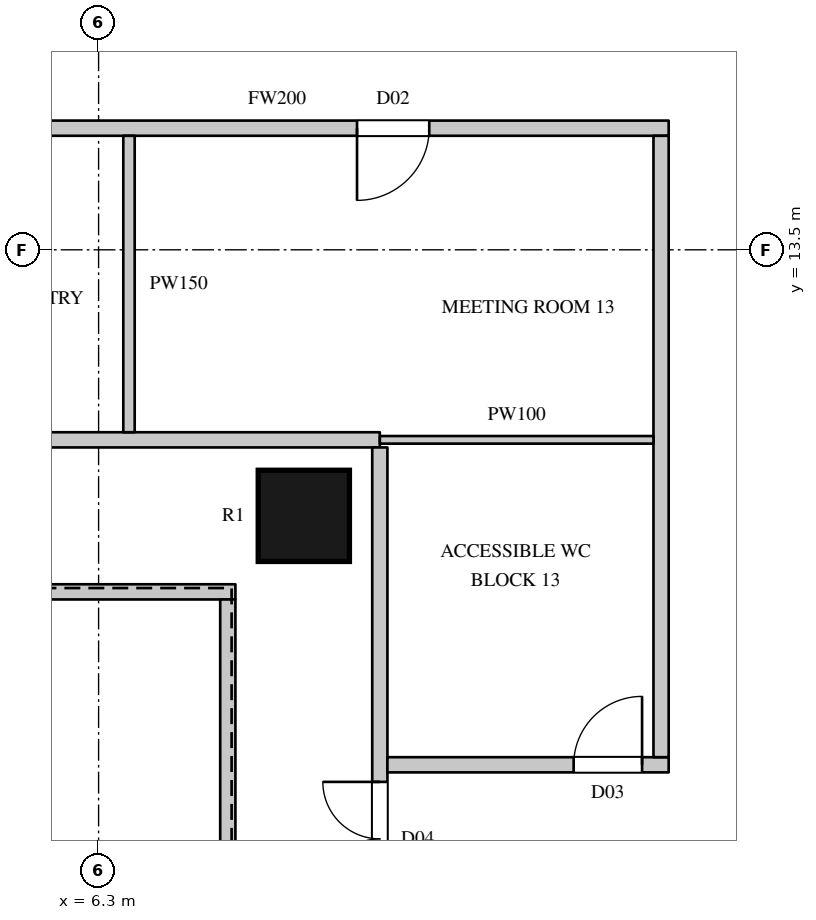
"""IFC4 building model, lengths in metres.
Left out: names, types, materials, properties, quantities, classifications, styles, units other than length and angle.
Written with IfcOpenShell. Run it as: python <this file> out.ifc"""

import sys

from ifc_helpers import new_model, si_unit, direction, frame, frame_2d, origin, origin_2d, place, context, subcontext, project, spatial, rectangle, circle, extrude, element, fill, save


model = new_model("IFC4")
c1 = context("Model", 3, precision=1e-05, world=origin(), true_north=direction((0.0, 1.0)))
c2 = subcontext(c1, "Body", "Model", "MODEL_VIEW")
j1 = project(units=[si_unit("LENGTHUNIT", "METRE"), si_unit("PLANEANGLEUNIT", "RADIAN")], contexts=[c1])
p1 = place(None, origin())
s1 = spatial("IfcSite", under=j1, at=p1, CompositionType="ELEMENT")
p2 = place(p1, origin())
s2 = spatial("IfcBuilding", under=s1, at=p2, CompositionType="ELEMENT")
p3 = place(p2, frame((0.0, 0.0, 77.1)))
s3 = spatial("IfcBuildingStorey", under=s2, at=p3, CompositionType="ELEMENT", Elevation=77.1)
p4 = place(p3, frame((9.0, 10.0, 0.0), z_axis=(0.0, 0.0, 1.0), x_axis=(1.0, 0.0, 0.0)))
e1 = element("IfcColumn", 1, at=p4, inside=s3, PredefinedType="COLUMN", context=c2, shape_type="SweptSolid", body=[
    extrude(circle(Radius=0.6, at=origin_2d()), origin(), (0.0, 0.0, 1.0), 3.6),
])
p5 = place(p3, frame((-7.9, 11.0, 0.0), z_axis=(0.0, 0.0, 1.0), x_axis=(1.0, 0.0, 0.0)))
e2 = element("IfcWall", 2, at=p5, inside=s3, PredefinedType="PARTITIONING", context=c2, shape_type="SweptSolid", body=[
    extrude(rectangle(XDim=17.9, YDim=0.2, at=frame_2d((8.95, 0.0))), origin(), (0.0, 0.0, 1.0), 3.3),
])
p6 = place(p5, frame((9.5, 0.0, 0.0)))
e3 = element("IfcOpeningElement", 3, at=p6, cuts=e2, PredefinedType="OPENING", context=c2, shape_type="SweptSolid", body=[
    extrude(rectangle(XDim=1.5, YDim=2.2, at=frame_2d((0.75, 1.1))), frame((0.0, 0.11, 0.0), z_axis=(0.0, -1.0, 0.0), x_axis=(1.0, 0.0, 0.0)), (0.0, 0.0, 1.0), 0.22),
])
p7 = place(p3, frame((-6.1, 9.0, 0.0), z_axis=(0.0, 0.0, 1.0), x_axis=(1.0, 0.0, 0.0)))
e4 = element("IfcWall", 4, at=p7, inside=s3, PredefinedType="PARTITIONING", context=c2, shape_type="SweptSolid", body=[
    extrude(rectangle(XDim=14.2, YDim=0.2, at=frame_2d((7.1, 0.0))), origin(), (0.0, 0.0, 1.0), 3.3),
])
p8 = place(p3, frame((3.5, 15.1, 0.0), z_axis=(0.0, 0.0, 1.0), x_axis=(1.0, 0.0, 0.0)))
e5 = element("IfcWall", 5, at=p8, inside=s3, PredefinedType="PARTITIONING", context=c2, shape_type="SweptSolid", body=[
    extrude(rectangle(XDim=10.3, YDim=0.2, at=frame_2d((5.15, 0.0))), origin(), (0.0, 0.0, 1.0), 3.3),
])
p9 = place(p8, frame((6.2, 0.0, 0.0)))
e6 = element("IfcOpeningElement", 6, at=p9, cuts=e5, PredefinedType="OPENING", context=c2, shape_type="SweptSolid", body=[
    extrude(rectangle(XDim=0.95, YDim=2.2, at=frame_2d((0.475, 1.1))), frame((0.0, 0.11, 0.0), z_axis=(0.0, -1.0, 0.0), x_axis=(1.0, 0.0, 0.0)), (0.0, 0.0, 1.0), 0.22),
])
p10 = place(p3, frame((8.0, -8.9, 0.0), z_axis=(0.0, 0.0, 1.0), x_axis=(0.0, 1.0, 0.0)))
e7 = element("IfcWall", 7, at=p10, inside=s3, PredefinedType="PARTITIONING", context=c2, shape_type="SweptSolid", body=[
    extrude(rectangle(XDim=17.8, YDim=0.2, at=frame_2d((8.9, 0.0))), origin(), (0.0, 0.0, 1.0), 3.3),
])
p11 = place(p3, frame((10.0, -10.9, 0.0), z_axis=(0.0, 0.0, 1.0), x_axis=(0.0, 1.0, 0.0)))
e8 = element("IfcWall", 8, at=p11, inside=s3, PredefinedType="PARTITIONING", context=c2, shape_type="SweptSolid", body=[
    extrude(rectangle(XDim=21.8, YDim=0.2, at=frame_2d((10.9, 0.0))), origin(), (0.0, 0.0, 1.0), 3.3),
])
p12 = place(p11, frame((15.9, 0.0, 0.0)))
e9 = element("IfcOpeningElement", 9, at=p12, cuts=e8, PredefinedType="OPENING", context=c2, shape_type="SweptSolid", body=[
    extrude(rectangle(XDim=1.5, YDim=2.2, at=frame_2d((0.75, 1.1))), frame((0.0, 0.11, 0.0), z_axis=(0.0, -1.0, 0.0), x_axis=(1.0, 0.0, 0.0)), (0.0, 0.0, 1.0), 0.22),
])
p13 = place(p11, frame((8.75, 0.0, 0.0)))
e10 = element("IfcOpeningElement", 10, at=p13, cuts=e8, PredefinedType="OPENING", context=c2, shape_type="SweptSolid", body=[
    extrude(rectangle(XDim=1.5, YDim=2.2, at=frame_2d((0.75, 1.1))), frame((0.0, 0.11, 0.0), z_axis=(0.0, -1.0, 0.0), x_axis=(1.0, 0.0, 0.0)), (0.0, 0.0, 1.0), 0.22),
])
p14 = place(p3, frame((10.1, 6.725, 0.0), z_axis=(0.0, 0.0, 1.0), x_axis=(1.0, 0.0, 0.0)))
e11 = element("IfcWall", 11, at=p14, inside=s3, PredefinedType="PARTITIONING", context=c2, shape_type="SweptSolid", body=[
    extrude(rectangle(XDim=3.7, YDim=0.2, at=frame_2d((1.85, 0.0))), origin(), (0.0, 0.0, 1.0), 3.3),
])
p15 = place(p14, frame((2.45, 0.0, 0.0)))
e12 = element("IfcOpeningElement", 12, at=p15, cuts=e11, PredefinedType="OPENING", context=c2, shape_type="SweptSolid", body=[
    extrude(rectangle(XDim=0.9, YDim=2.2, at=frame_2d((0.45, 1.1))), frame((0.0, 0.11, 0.0), z_axis=(0.0, -1.0, 0.0), x_axis=(1.0, 0.0, 0.0)), (0.0, 0.0, 1.0), 0.22),
])
p16 = place(p3, frame((13.7, 6.825, 0.0), z_axis=(0.0, 0.0, 1.0), x_axis=(0.0, 1.0, 0.0)))
e13 = element("IfcWall", 13, at=p16, inside=s3, PredefinedType="PARTITIONING", context=c2, shape_type="SweptSolid", body=[
    extrude(rectangle(XDim=8.175, YDim=0.2, at=frame_2d((4.087, 0.0))), origin(), (0.0, 0.0, 1.0), 3.3),
])
p17 = place(p3, frame((6.7, 11.1, 0.0), z_axis=(0.0, 0.0, 1.0), x_axis=(0.0, 1.0, 0.0)))
e14 = element("IfcWall", 14, at=p17, inside=s3, PredefinedType="PARTITIONING", context=c2, shape_type="SweptSolid", body=[
    extrude(rectangle(XDim=3.9, YDim=0.15, at=frame_2d((1.95, 0.0))), origin(), (0.0, 0.0, 1.0), 3.3),
])
p18 = place(p3, frame((10.0, 11.0, 0.0), z_axis=(0.0, 0.0, 1.0), x_axis=(1.0, 0.0, 0.0)))
e15 = element("IfcWall", 15, at=p18, inside=s3, PredefinedType="PARTITIONING", context=c2, shape_type="SweptSolid", body=[
    extrude(rectangle(XDim=3.6, YDim=0.1, at=frame_2d((1.8, 0.0))), origin(), (0.0, 0.0, 1.0), 3.3),
])
p19 = place(p12, origin())
e16 = element("IfcDoor", 16, at=p19, inside=s3, OperationType="DOUBLE_DOOR_SINGLE_SWING", PredefinedType="DOOR", context=c2, shape_type="SweptSolid", body=[
    extrude(rectangle(XDim=1.5, YDim=2.2, at=frame_2d((0.75, 1.1))), frame((0.0, 0.025, 0.0), z_axis=(0.0, -1.0, 0.0), x_axis=(1.0, 0.0, 0.0)), (0.0, 0.0, 1.0), 0.05),
])
fill(e9, e16)
p20 = place(p9, origin())
e17 = element("IfcDoor", 17, at=p20, inside=s3, OperationType="SINGLE_SWING_RIGHT", PredefinedType="DOOR", context=c2, shape_type="SweptSolid", body=[
    extrude(rectangle(XDim=0.95, YDim=2.2, at=frame_2d((0.475, 1.1))), frame((0.0, 0.025, 0.0), z_axis=(0.0, -1.0, 0.0), x_axis=(1.0, 0.0, 0.0)), (0.0, 0.0, 1.0), 0.05),
])
fill(e6, e17)
p21 = place(p15, origin())
e18 = element("IfcDoor", 18, at=p21, inside=s3, OperationType="SINGLE_SWING_RIGHT", PredefinedType="DOOR", context=c2, shape_type="SweptSolid", body=[
    extrude(rectangle(XDim=0.9, YDim=2.2, at=frame_2d((0.45, 1.1))), frame((0.0, 0.025, 0.0), z_axis=(0.0, -1.0, 0.0), x_axis=(1.0, 0.0, 0.0)), (0.0, 0.0, 1.0), 0.05),
])
fill(e12, e18)
save(model, sys.argv[1])
